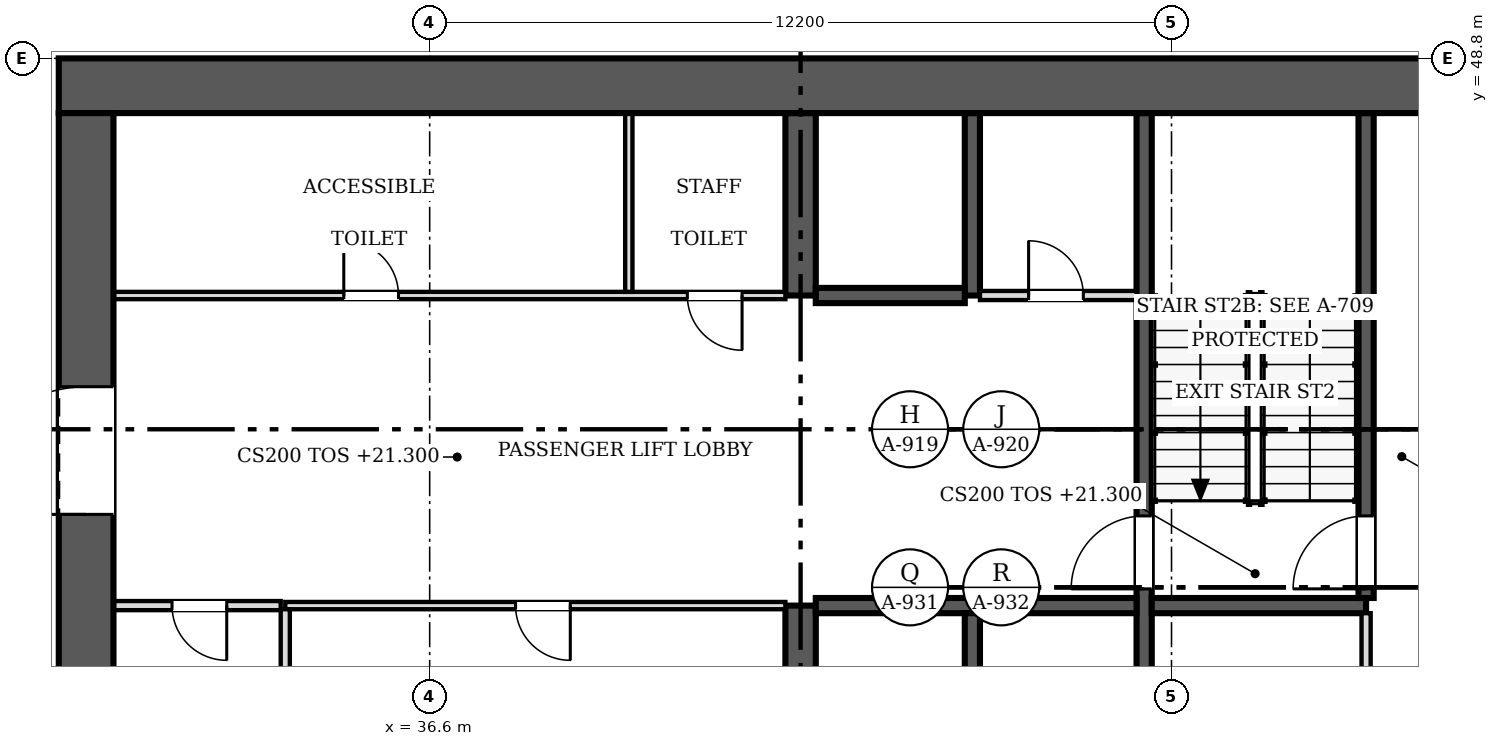
"""IFC4 building model, lengths in metres.
Left out: names, types, materials, properties, quantities, classifications, styles, units other than length and angle.
Written with IfcOpenShell. Run it as: python <this file> out.ifc"""

import sys

from ifc_helpers import new_model, si_unit, direction, frame, frame_2d, origin, place, context, subcontext, project, spatial, rectangle, extrude, source, transform, mapped, element, fill, save


model = new_model("IFC4")
c1 = context("Model", 3, precision=1e-05, world=origin(), true_north=direction((0.0, 1.0)))
c2 = subcontext(c1, "Body", "Model", "MODEL_VIEW")
j1 = project(units=[si_unit("LENGTHUNIT", "METRE"), si_unit("PLANEANGLEUNIT", "RADIAN")], contexts=[c1])
p1 = place(None, origin())
s1 = spatial("IfcSite", under=j1, at=p1, CompositionType="ELEMENT")
p2 = place(p1, origin())
s2 = spatial("IfcBuilding", under=s1, at=p2, CompositionType="ELEMENT")
p3 = place(p2, frame((0.0, 0.0, 21.3)))
s3 = spatial("IfcBuildingStorey", under=s2, at=p3, CompositionType="ELEMENT", Elevation=21.3)
p4 = place(p3, frame((30.95, 25.3, 0.0), z_axis=(0.0, 0.0, 1.0), x_axis=(0.0, 1.0, 0.0)))
e1 = element("IfcWall", 1, at=p4, inside=s3, PredefinedType="SHEAR", context=c2, shape_type="SweptSolid", body=[
    extrude(rectangle(XDim=22.6, YDim=0.9, at=frame_2d((11.3, 0.0))), origin(), (0.0, 0.0, 1.0), 4.5),
])
m1 = source(origin(), c2, "Body", "SweptSolid", [
    extrude(rectangle(XDim=2.1, YDim=2.4, at=frame_2d((1.05, 1.2))), frame((0.0, 0.46, 0.0), z_axis=(0.0, -1.0, 0.0), x_axis=(1.0, 0.0, 0.0)), (0.0, 0.0, 1.0), 0.92),
])
p5 = place(p4, frame((4.5, 0.0, 0.0)))
e2 = element("IfcOpeningElement", 2, at=p5, cuts=e1, PredefinedType="OPENING", context=c2, shape_type="MappedRepresentation", body=[
    mapped(m1, transform((0.0, 0.0, 0.0), scale=1.0)),
])
p6 = place(p4, frame((16.0, 0.0, 0.0)))
e3 = element("IfcOpeningElement", 3, at=p6, cuts=e1, PredefinedType="OPENING", context=c2, shape_type="MappedRepresentation", body=[
    mapped(m1, transform((0.0, 0.0, 0.0), scale=1.0)),
])
p7 = place(p3, frame((30.5, 48.35, 0.0), z_axis=(0.0, 0.0, 1.0), x_axis=(1.0, 0.0, 0.0)))
e4 = element("IfcWall", 4, at=p7, inside=s3, PredefinedType="SHEAR", context=c2, shape_type="SweptSolid", body=[
    extrude(rectangle(XDim=24.4, YDim=0.9, at=frame_2d((12.2, 0.0))), origin(), (0.0, 0.0, 1.0), 4.5),
])
p8 = place(p3, frame((42.7, 36.85, 0.0), z_axis=(0.0, 0.0, 1.0), x_axis=(0.0, 1.0, 0.0)))
e5 = element("IfcWall", 5, at=p8, inside=s3, PredefinedType="SHEAR", context=c2, shape_type="SweptSolid", body=[
    extrude(rectangle(XDim=2.95, YDim=0.5, at=frame_2d((1.475, 0.0))), origin(), (0.0, 0.0, 1.0), 4.5),
])
p9 = place(p3, frame((42.7, 44.9, 0.0), z_axis=(0.0, 0.0, 1.0), x_axis=(0.0, 1.0, 0.0)))
e6 = element("IfcWall", 6, at=p9, inside=s3, PredefinedType="SHEAR", context=c2, shape_type="SweptSolid", body=[
    extrude(rectangle(XDim=3.0, YDim=0.5, at=frame_2d((1.5, 0.0))), origin(), (0.0, 0.0, 1.0), 4.5),
])
p10 = place(p3, frame((48.35, 47.9, 0.0), z_axis=(0.0, 0.0, 1.0), x_axis=(0.0, -1.0, 0.0)))
e7 = element("IfcWall", 7, at=p10, inside=s3, PredefinedType="SOLIDWALL", context=c2, shape_type="SweptSolid", body=[
    extrude(rectangle(XDim=11.05, YDim=0.25, at=frame_2d((5.525, 0.0))), origin(), (0.0, 0.0, 1.0), 4.5),
])
m2 = source(origin(), c2, "Body", "SweptSolid", [
    extrude(rectangle(XDim=1.2, YDim=2.1, at=frame_2d((0.6, 1.05))), frame((0.0, 0.135, 0.0), z_axis=(0.0, -1.0, 0.0), x_axis=(1.0, 0.0, 0.0)), (0.0, 0.0, 1.0), 0.27),
])
p11 = place(p10, frame((6.625, 0.0, 0.0)))
e8 = element("IfcOpeningElement", 8, at=p11, cuts=e7, PredefinedType="OPENING", context=c2, shape_type="MappedRepresentation", body=[
    mapped(m2, transform((0.0, 0.0, 0.0), scale=1.0)),
])
p12 = place(p3, frame((42.95, 39.8, 0.0), z_axis=(0.0, 0.0, 1.0), x_axis=(1.0, 0.0, 0.0)))
e9 = element("IfcWall", 9, at=p12, inside=s3, PredefinedType="SOLIDWALL", context=c2, shape_type="SweptSolid", body=[
    extrude(rectangle(XDim=5.275, YDim=0.25, at=frame_2d((2.638, 0.0))), origin(), (0.0, 0.0, 1.0), 4.5),
])
p13 = place(p3, frame((48.475, 39.8, 0.0), z_axis=(0.0, 0.0, 1.0), x_axis=(1.0, 0.0, 0.0)))
e10 = element("IfcWall", 10, at=p13, inside=s3, PredefinedType="SOLIDWALL", context=c2, shape_type="SweptSolid", body=[
    extrude(rectangle(XDim=3.525, YDim=0.25, at=frame_2d((1.762, 0.0))), origin(), (0.0, 0.0, 1.0), 4.5),
])
p14 = place(p3, frame((52.0, 39.925, 0.0), z_axis=(0.0, 0.0, 1.0), x_axis=(0.0, 1.0, 0.0)))
e11 = element("IfcWall", 11, at=p14, inside=s3, PredefinedType="SOLIDWALL", context=c2, shape_type="SweptSolid", body=[
    extrude(rectangle(XDim=7.975, YDim=0.25, at=frame_2d((3.987, 0.0))), origin(), (0.0, 0.0, 1.0), 4.5),
])
p15 = place(p14, frame((0.15, 0.0, 0.0)))
e12 = element("IfcOpeningElement", 12, at=p15, cuts=e11, PredefinedType="OPENING", context=c2, shape_type="MappedRepresentation", body=[
    mapped(m2, transform((0.0, 0.0, 0.0), scale=1.0)),
])
p16 = place(p3, frame((45.525, 36.85, 0.0), z_axis=(0.0, 0.0, 1.0), x_axis=(0.0, 1.0, 0.0)))
e13 = element("IfcWall", 13, at=p16, inside=s3, PredefinedType="SOLIDWALL", context=c2, shape_type="SweptSolid", body=[
    extrude(rectangle(XDim=2.825, YDim=0.25, at=frame_2d((1.413, 0.0))), origin(), (0.0, 0.0, 1.0), 4.5),
])
p17 = place(p3, frame((45.525, 44.9, 0.0), z_axis=(0.0, 0.0, 1.0), x_axis=(0.0, 1.0, 0.0)))
e14 = element("IfcWall", 14, at=p17, inside=s3, PredefinedType="SOLIDWALL", context=c2, shape_type="SweptSolid", body=[
    extrude(rectangle(XDim=3.0, YDim=0.25, at=frame_2d((1.5, 0.0))), origin(), (0.0, 0.0, 1.0), 4.5),
])
p18 = place(p3, frame((42.95, 44.9, 0.0), z_axis=(0.0, 0.0, 1.0), x_axis=(1.0, 0.0, 0.0)))
e15 = element("IfcWall", 15, at=p18, inside=s3, PredefinedType="SOLIDWALL", context=c2, shape_type="SweptSolid", body=[
    extrude(rectangle(XDim=2.45, YDim=0.25, at=frame_2d((1.225, 0.0))), origin(), (0.0, 0.0, 1.0), 4.5),
])
p19 = place(p3, frame((31.4, 44.9, 0.0), z_axis=(0.0, 0.0, 1.0), x_axis=(1.0, 0.0, 0.0)))
e16 = element("IfcWall", 16, at=p19, inside=s3, PredefinedType="PARTITIONING", context=c2, shape_type="SweptSolid", body=[
    extrude(rectangle(XDim=11.05, YDim=0.12, at=frame_2d((5.525, 0.0))), origin(), (0.0, 0.0, 1.0), 4.3),
])
m3 = source(origin(), c2, "Body", "SweptSolid", [
    extrude(rectangle(XDim=0.9, YDim=2.1, at=frame_2d((0.45, 1.05))), frame((0.0, 0.07, 0.0), z_axis=(0.0, -1.0, 0.0), x_axis=(1.0, 0.0, 0.0)), (0.0, 0.0, 1.0), 0.14),
])
p20 = place(p19, frame((3.788, 0.0, 0.0)))
e17 = element("IfcOpeningElement", 17, at=p20, cuts=e16, PredefinedType="OPENING", context=c2, shape_type="MappedRepresentation", body=[
    mapped(m3, transform((0.0, 0.0, 0.0), scale=1.0)),
])
p21 = place(p19, frame((9.438, 0.0, 0.0)))
e18 = element("IfcOpeningElement", 18, at=p21, cuts=e16, PredefinedType="OPENING", context=c2, shape_type="MappedRepresentation", body=[
    mapped(m3, transform((0.0, 0.0, 0.0), scale=1.0)),
])
p22 = place(p3, frame((42.45, 39.8, 0.0), z_axis=(0.0, 0.0, 1.0), x_axis=(-1.0, 0.0, 0.0)))
e19 = element("IfcWall", 19, at=p22, inside=s3, PredefinedType="PARTITIONING", context=c2, shape_type="SweptSolid", body=[
    extrude(rectangle(XDim=8.225, YDim=0.12, at=frame_2d((4.112, 0.0))), origin(), (0.0, 0.0, 1.0), 4.3),
])
p23 = place(p22, frame((3.538, 0.0, 0.0)))
e20 = element("IfcOpeningElement", 20, at=p23, cuts=e19, PredefinedType="OPENING", context=c2, shape_type="MappedRepresentation", body=[
    mapped(m3, transform((0.0, 0.0, 0.0), scale=1.0)),
])
p24 = place(p3, frame((52.0, 33.525, 0.0), z_axis=(0.0, 0.0, 1.0), x_axis=(0.0, 1.0, 0.0)))
e21 = element("IfcWall", 21, at=p24, inside=s3, PredefinedType="PARTITIONING", context=c2, shape_type="SweptSolid", body=[
    extrude(rectangle(XDim=6.15, YDim=0.15, at=frame_2d((3.075, 0.0))), origin(), (0.0, 0.0, 1.0), 4.3),
])
m4 = source(origin(), c2, "Body", "SweptSolid", [
    extrude(rectangle(XDim=0.9, YDim=2.1, at=frame_2d((0.45, 1.05))), frame((0.0, 0.085, 0.0), z_axis=(0.0, -1.0, 0.0), x_axis=(1.0, 0.0, 0.0)), (0.0, 0.0, 1.0), 0.17),
])
p25 = place(p24, frame((1.025, 0.0, 0.0)))
e22 = element("IfcOpeningElement", 22, at=p25, cuts=e21, PredefinedType="OPENING", context=c2, shape_type="MappedRepresentation", body=[
    mapped(m4, transform((0.0, 0.0, 0.0), scale=1.0)),
])
p26 = place(p3, frame((34.225, 36.85, 0.0), z_axis=(0.0, 0.0, 1.0), x_axis=(0.0, 1.0, 0.0)))
e23 = element("IfcWall", 23, at=p26, inside=s3, PredefinedType="PARTITIONING", context=c2, shape_type="SweptSolid", body=[
    extrude(rectangle(XDim=2.89, YDim=0.15, at=frame_2d((1.445, 0.0))), origin(), (0.0, 0.0, 1.0), 4.3),
])
p27 = place(p3, frame((39.875, 44.96, 0.0), z_axis=(0.0, 0.0, 1.0), x_axis=(0.0, 1.0, 0.0)))
e24 = element("IfcWall", 24, at=p27, inside=s3, PredefinedType="PARTITIONING", context=c2, shape_type="SweptSolid", body=[
    extrude(rectangle(XDim=2.94, YDim=0.12, at=frame_2d((1.47, 0.0))), origin(), (0.0, 0.0, 1.0), 4.3),
])
p28 = place(p3, frame((45.65, 44.9, 0.0), z_axis=(0.0, 0.0, 1.0), x_axis=(1.0, 0.0, 0.0)))
e25 = element("IfcWall", 25, at=p28, inside=s3, PredefinedType="PARTITIONING", context=c2, shape_type="SweptSolid", body=[
    extrude(rectangle(XDim=2.575, YDim=0.15, at=frame_2d((1.288, 0.0))), origin(), (0.0, 0.0, 1.0), 4.3),
])
p29 = place(p28, frame((0.8, 0.0, 0.0)))
e26 = element("IfcOpeningElement", 26, at=p29, cuts=e25, PredefinedType="OPENING", context=c2, shape_type="MappedRepresentation", body=[
    mapped(m4, transform((0.0, 0.0, 0.0), scale=1.0)),
])
p30 = place(p3, frame((34.15, 39.8, 0.0), z_axis=(0.0, 0.0, 1.0), x_axis=(-1.0, 0.0, 0.0)))
e27 = element("IfcWall", 27, at=p30, inside=s3, PredefinedType="PARTITIONING", context=c2, shape_type="SweptSolid", body=[
    extrude(rectangle(XDim=2.75, YDim=0.15, at=frame_2d((1.375, 0.0))), origin(), (0.0, 0.0, 1.0), 4.3),
])
p31 = place(p30, frame((0.887, 0.0, 0.0)))
e28 = element("IfcOpeningElement", 28, at=p31, cuts=e27, PredefinedType="OPENING", context=c2, shape_type="MappedRepresentation", body=[
    mapped(m4, transform((0.0, 0.0, 0.0), scale=1.0)),
])
m5 = source(origin(), c2, "Body", "SweptSolid", [
    extrude(rectangle(XDim=2.1, YDim=2.4, at=frame_2d((1.05, 1.2))), frame((0.0, 0.025, 0.0), z_axis=(0.0, -1.0, 0.0), x_axis=(1.0, 0.0, 0.0)), (0.0, 0.0, 1.0), 0.05),
])
p32 = place(p6, origin())
e29 = element("IfcDoor", 29, at=p32, inside=s3, OperationType="DOUBLE_DOOR_SINGLE_SWING", PredefinedType="DOOR", context=c2, shape_type="MappedRepresentation", body=[
    mapped(m5, transform((0.0, 0.0, 0.0), scale=1.0)),
])
fill(e3, e29)
m6 = source(origin(), c2, "Body", "SweptSolid", [
    extrude(rectangle(XDim=1.2, YDim=2.1, at=frame_2d((0.6, 1.05))), frame((0.0, 0.025, 0.0), z_axis=(0.0, -1.0, 0.0), x_axis=(1.0, 0.0, 0.0)), (0.0, 0.0, 1.0), 0.05),
])
p33 = place(p11, origin())
e30 = element("IfcDoor", 30, at=p33, inside=s3, OperationType="SINGLE_SWING_RIGHT", PredefinedType="DOOR", context=c2, shape_type="MappedRepresentation", body=[
    mapped(m6, transform((0.0, 0.0, 0.0), scale=1.0)),
])
fill(e8, e30)
p34 = place(p15, origin())
e31 = element("IfcDoor", 31, at=p34, inside=s3, OperationType="SINGLE_SWING_LEFT", PredefinedType="DOOR", context=c2, shape_type="MappedRepresentation", body=[
    mapped(m6, transform((0.0, 0.0, 0.0), scale=1.0)),
])
fill(e12, e31)
m7 = source(origin(), c2, "Body", "SweptSolid", [
    extrude(rectangle(XDim=0.9, YDim=2.1, at=frame_2d((0.45, 1.05))), frame((0.0, 0.025, 0.0), z_axis=(0.0, -1.0, 0.0), x_axis=(1.0, 0.0, 0.0)), (0.0, 0.0, 1.0), 0.05),
])
p35 = place(p20, origin())
e32 = element("IfcDoor", 32, at=p35, inside=s3, OperationType="SINGLE_SWING_LEFT", PredefinedType="DOOR", context=c2, shape_type="MappedRepresentation", body=[
    mapped(m7, transform((0.0, 0.0, 0.0), scale=1.0)),
])
fill(e17, e32)
p36 = place(p21, origin())
e33 = element("IfcDoor", 33, at=p36, inside=s3, OperationType="SINGLE_SWING_RIGHT", PredefinedType="DOOR", context=c2, shape_type="MappedRepresentation", body=[
    mapped(m7, transform((0.0, 0.0, 0.0), scale=1.0)),
])
fill(e18, e33)
p37 = place(p23, origin())
e34 = element("IfcDoor", 34, at=p37, inside=s3, OperationType="SINGLE_SWING_LEFT", PredefinedType="DOOR", context=c2, shape_type="MappedRepresentation", body=[
    mapped(m7, transform((0.0, 0.0, 0.0), scale=1.0)),
])
fill(e20, e34)
p38 = place(p29, origin())
e35 = element("IfcDoor", 35, at=p38, inside=s3, OperationType="SINGLE_SWING_LEFT", PredefinedType="DOOR", context=c2, shape_type="MappedRepresentation", body=[
    mapped(m7, transform((0.0, 0.0, 0.0), scale=1.0)),
])
fill(e26, e35)
p39 = place(p31, origin())
e36 = element("IfcDoor", 36, at=p39, inside=s3, OperationType="SINGLE_SWING_LEFT", PredefinedType="DOOR", context=c2, shape_type="MappedRepresentation", body=[
    mapped(m7, transform((0.0, 0.0, 0.0), scale=1.0)),
])
fill(e28, e36)
save(model, sys.argv[1])
